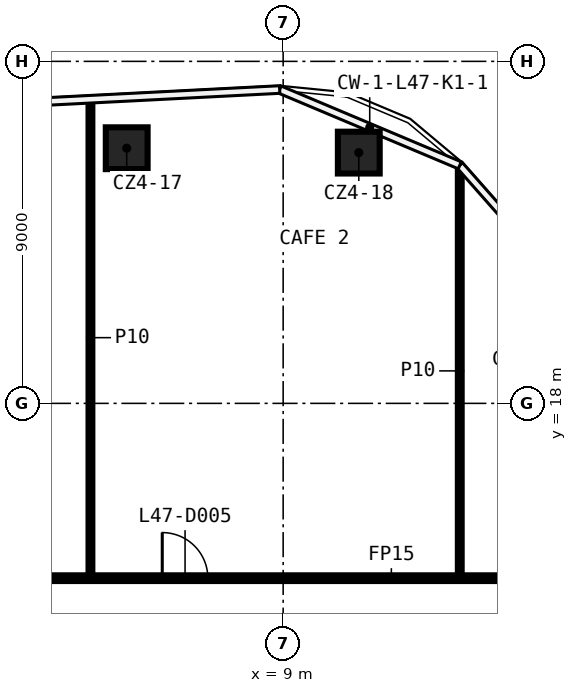
"""IFC4 building model, lengths in metres.
Left out: names, types, materials, properties, quantities, classifications, styles, units other than length and angle.
Written with IfcOpenShell. Run it as: python <this file> out.ifc"""

import sys

from ifc_helpers import new_model, si_unit, direction, frame, frame_2d, origin, origin_2d, place, context, subcontext, project, spatial, rectangle, extrude, element, fill, save


model = new_model("IFC4")
c1 = context("Model", 3, precision=1e-05, world=origin(), true_north=direction((0.0, 1.0)))
c2 = subcontext(c1, "Body", "Model", "MODEL_VIEW")
j1 = project(units=[si_unit("LENGTHUNIT", "METRE"), si_unit("PLANEANGLEUNIT", "RADIAN")], contexts=[c1])
p1 = place(None, origin())
s1 = spatial("IfcSite", under=j1, at=p1, CompositionType="ELEMENT")
p2 = place(p1, origin())
s2 = spatial("IfcBuilding", under=s1, at=p2, CompositionType="ELEMENT")
p3 = place(p2, frame((0.0, 0.0, 228.6)))
s3 = spatial("IfcBuildingStorey", under=s2, at=p3, CompositionType="ELEMENT", Elevation=228.6)
for number, where, z_axis, x_axis in (
    (1, (4.883, 24.714, 0.0), (0.0, 0.0, 1.0), (1.0, 0.0, 0.0)),
    (2, (10.99, 24.599, 0.0), (0.0, 0.0, 1.0), (1.0, 0.0, 0.0)),
):
    element("IfcColumn", number, at=place(p3, frame(where, z_axis=z_axis, x_axis=x_axis)), inside=s3, PredefinedType="COLUMN", context=c2, shape_type="SweptSolid", body=[
        extrude(rectangle(XDim=1.1, YDim=1.1, at=origin_2d()), origin(), (0.0, 0.0, 1.0), 3.75),
    ])
p4 = place(p3, frame((-2.075, 13.4, 0.0), z_axis=(0.0, 0.0, 1.0), x_axis=(1.0, 0.0, 0.0)))
e3 = element("IfcWall", 3, at=p4, inside=s3, PredefinedType="PARTITIONING", context=c2, shape_type="SweptSolid", body=[
    extrude(rectangle(XDim=18.55, YDim=0.15, at=frame_2d((9.275, 0.0))), origin(), (0.0, 0.0, 1.0), 3.75),
])
p5 = place(p4, frame((2.91, 0.0, 0.0)))
e4 = element("IfcOpeningElement", 4, at=p5, cuts=e3, PredefinedType="OPENING", context=c2, shape_type="SweptSolid", body=[
    extrude(rectangle(XDim=1.2, YDim=2.1, at=frame_2d((0.6, 1.05))), frame((0.0, 0.085, 0.0), z_axis=(0.0, -1.0, 0.0), x_axis=(1.0, 0.0, 0.0)), (0.0, 0.0, 1.0), 0.17),
])
p6 = place(p4, frame((7.894, 0.0, 0.0)))
e5 = element("IfcOpeningElement", 5, at=p6, cuts=e3, PredefinedType="OPENING", context=c2, shape_type="SweptSolid", body=[
    extrude(rectangle(XDim=1.2, YDim=2.1, at=frame_2d((0.6, 1.05))), frame((0.0, 0.085, 0.0), z_axis=(0.0, -1.0, 0.0), x_axis=(1.0, 0.0, 0.0)), (0.0, 0.0, 1.0), 0.17),
])
p7 = place(p3, frame((13.647, 13.475, 0.0), z_axis=(0.0, 0.0, 1.0), x_axis=(0.0, 1.0, 0.0)))
e6 = element("IfcWall", 6, at=p7, inside=s3, PredefinedType="PARTITIONING", context=c2, shape_type="SweptSolid", body=[
    extrude(rectangle(XDim=10.76, YDim=0.1, at=frame_2d((5.38, 0.0))), origin(), (0.0, 0.0, 1.0), 3.75),
])
p8 = place(p3, frame((3.929, 13.475, 0.0), z_axis=(0.0, 0.0, 1.0), x_axis=(0.0, 1.0, 0.0)))
e7 = element("IfcWall", 7, at=p8, inside=s3, PredefinedType="PARTITIONING", context=c2, shape_type="SweptSolid", body=[
    extrude(rectangle(XDim=12.508, YDim=0.1, at=frame_2d((6.254, 0.0))), origin(), (0.0, 0.0, 1.0), 3.75),
])
p9 = place(p6, origin())
e8 = element("IfcDoor", 8, at=p9, inside=s3, OperationType="SINGLE_SWING_RIGHT", PredefinedType="DOOR", context=c2, shape_type="SweptSolid", body=[
    extrude(rectangle(XDim=1.2, YDim=2.1, at=frame_2d((0.6, 1.05))), frame((0.0, 0.025, 0.0), z_axis=(0.0, -1.0, 0.0), x_axis=(1.0, 0.0, 0.0)), (0.0, 0.0, 1.0), 0.05),
])
fill(e5, e8)
save(model, sys.argv[1])
